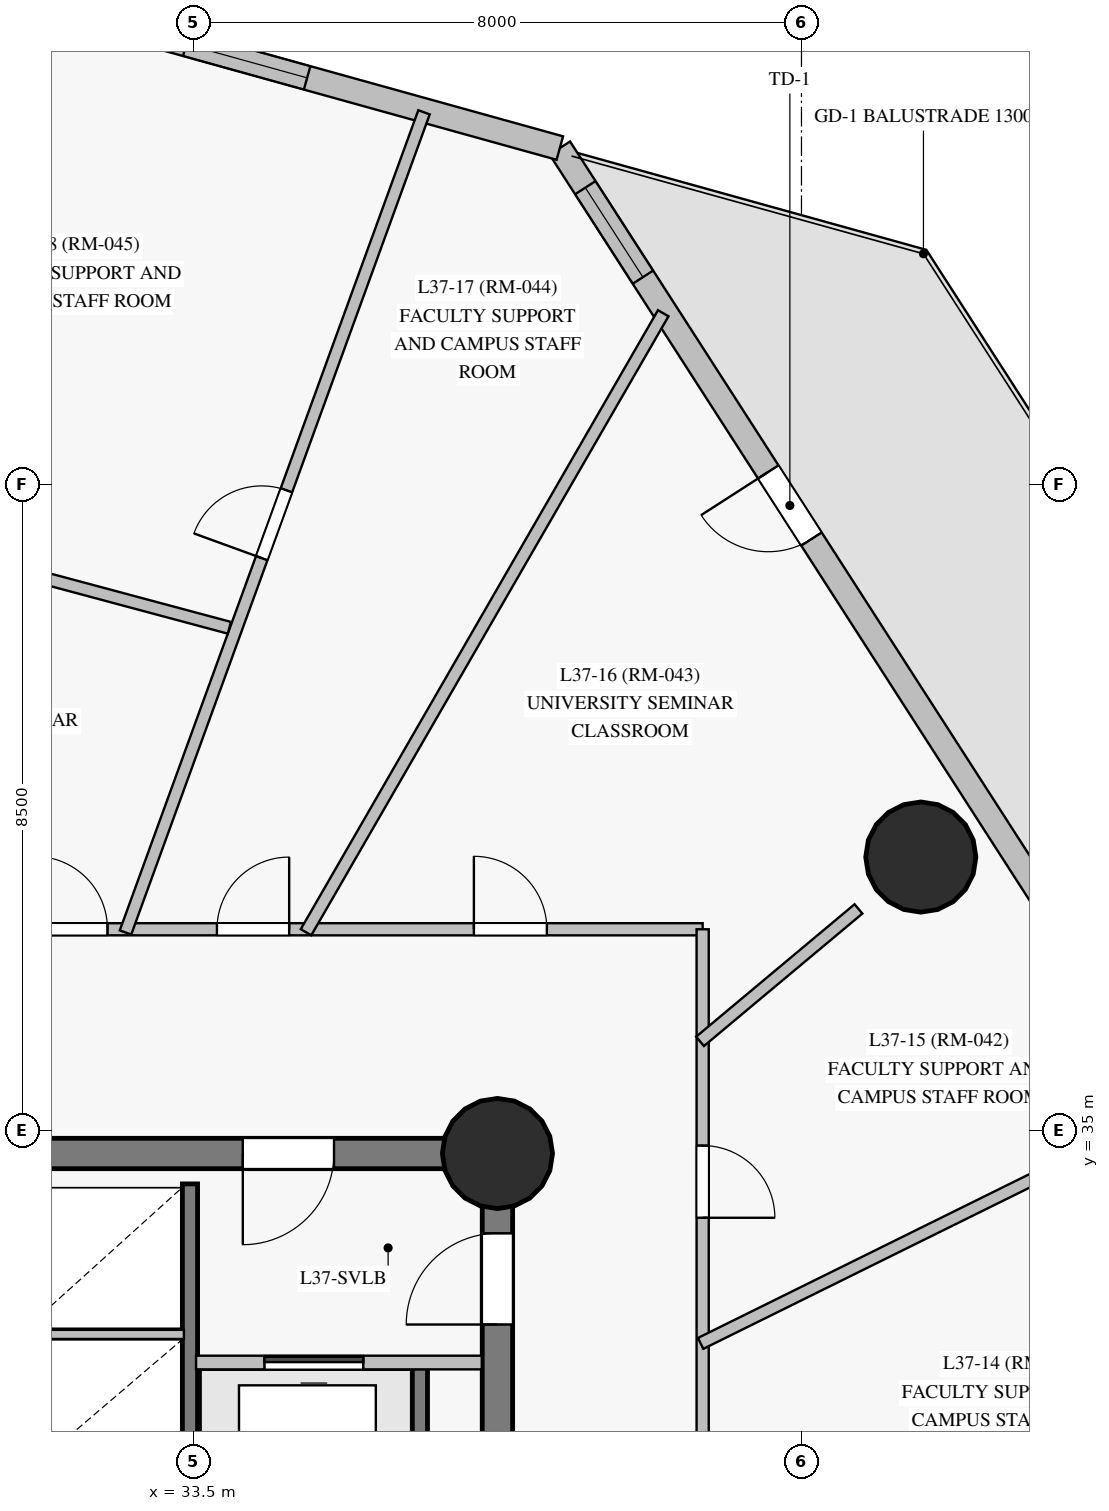
"""IFC4 building model, lengths in metres.
Left out: names, types, materials, properties, quantities, classifications, styles, units other than length and angle.
Written with IfcOpenShell. Run it as: python <this file> out.ifc"""

import sys

from ifc_helpers import new_model, si_unit, direction, frame, frame_2d, origin, origin_with_axes, origin_2d, place, context, subcontext, project, spatial, rectangle, circle, extrude, source, transform, mapped, element, fill, save


model = new_model("IFC4")
c1 = context("Model", 3, precision=1e-05, world=origin(), true_north=direction((0.0, 1.0)))
c2 = subcontext(c1, "Body", "Model", "MODEL_VIEW")
j1 = project(units=[si_unit("LENGTHUNIT", "METRE"), si_unit("PLANEANGLEUNIT", "RADIAN")], contexts=[c1])
p1 = place(None, origin())
s1 = spatial("IfcSite", under=j1, at=p1, CompositionType="ELEMENT")
p2 = place(p1, origin())
s2 = spatial("IfcBuilding", under=s1, at=p2, CompositionType="ELEMENT")
p3 = place(p2, frame((0.0, 0.0, 132.8)))
s3 = spatial("IfcBuildingStorey", under=s2, at=p3, CompositionType="ELEMENT", Elevation=132.8)
p4 = place(p3, frame((37.5, 18.3, 0.0), z_axis=(0.0, 0.0, 1.0), x_axis=(0.0, 1.0, 0.0)))
e1 = element("IfcWall", 1, at=p4, inside=s3, PredefinedType="SHEAR", context=c2, shape_type="SweptSolid", body=[
    extrude(rectangle(XDim=16.4, YDim=0.4, at=frame_2d((8.2, 0.0))), origin(), (0.0, 0.0, 1.0), 2.825),
])
p5 = place(p4, frame((14.15, 0.0, 0.0)))
e2 = element("IfcOpeningElement", 2, at=p5, cuts=e1, PredefinedType="OPENING", context=c2, shape_type="SweptSolid", body=[
    extrude(rectangle(XDim=1.2, YDim=2.15, at=frame_2d((0.6, 1.075))), frame((0.0, 0.21, 0.0), z_axis=(0.0, -1.0, 0.0), x_axis=(1.0, 0.0, 0.0)), (0.0, 0.0, 1.0), 0.42),
])
p6 = place(p3, frame((37.5, 34.7, 0.0), z_axis=(0.0, 0.0, 1.0), x_axis=(-1.0, 0.0, 0.0)))
e3 = element("IfcWall", 3, at=p6, inside=s3, PredefinedType="SHEAR", context=c2, shape_type="SweptSolid", body=[
    extrude(rectangle(XDim=10.95, YDim=0.4, at=frame_2d((5.475, 0.0))), origin(), (0.0, 0.0, 1.0), 2.825),
])
p7 = place(p6, frame((2.15, 0.0, 0.0)))
e4 = element("IfcOpeningElement", 4, at=p7, cuts=e3, PredefinedType="OPENING", context=c2, shape_type="SweptSolid", body=[
    extrude(rectangle(XDim=1.2, YDim=2.15, at=frame_2d((0.6, 1.075))), frame((0.0, 0.21, 0.0), z_axis=(0.0, -1.0, 0.0), x_axis=(1.0, 0.0, 0.0)), (0.0, 0.0, 1.0), 0.42),
])
p8 = place(p6, frame((6.35, 0.0, 0.0)))
e5 = element("IfcOpeningElement", 5, at=p8, cuts=e3, PredefinedType="OPENING", context=c2, shape_type="SweptSolid", body=[
    extrude(rectangle(XDim=1.1, YDim=2.15, at=frame_2d((0.55, 1.075))), frame((0.0, 0.21, 0.0), z_axis=(0.0, -1.0, 0.0), x_axis=(1.0, 0.0, 0.0)), (0.0, 0.0, 1.0), 0.42),
])
m1 = source(origin_with_axes(), c2, "Body", "SweptSolid", [
    extrude(circle(Radius=0.725, at=origin_2d()), origin(), (0.0, 0.0, 1.0), 3.05),
])
for number, where, z_axis, x_axis in (
    (6, (37.5, 34.7, 0.0), (0.0, 0.0, 1.0), (1.0, 0.0, 0.0)),
    (7, (43.07, 38.6, 0.0), (0.0, 0.0, 1.0), (1.0, 0.0, 0.0)),
):
    element("IfcColumn", number, at=place(p3, frame(where, z_axis=z_axis, x_axis=x_axis)), inside=s3, PredefinedType="COLUMN", context=c2, shape_type="MappedRepresentation", body=[
        mapped(m1, transform((0.0, 0.0, 0.0), scale=1.0)),
    ])
p9 = place(p3, frame((47.4, 33.821, 0.0), z_axis=(0.0, 0.0, 1.0), x_axis=(-0.541180462956, 0.840906479054, 0.0)))
e8 = element("IfcWall", 8, at=p9, inside=s3, PredefinedType="SOLIDWALL", context=c2, shape_type="SweptSolid", body=[
    extrude(rectangle(XDim=16.776, YDim=0.32, at=frame_2d((8.388, 0.0))), origin(), (0.0, 0.0, 1.0), 2.825),
])
p10 = place(p9, frame((2.885, 0.0, 0.85)))
e9 = element("IfcOpeningElement", 9, at=p10, cuts=e8, PredefinedType="OPENING", context=c2, shape_type="SweptSolid", body=[
    extrude(rectangle(XDim=1.65, YDim=1.65, at=frame_2d((0.825, 0.825))), frame((0.0, 0.17, 0.0), z_axis=(0.0, -1.0, 0.0), x_axis=(1.0, 0.0, 0.0)), (0.0, 0.0, 1.0), 0.34),
])
p11 = place(p9, frame((14.756, 0.0, 0.85)))
e10 = element("IfcOpeningElement", 10, at=p11, cuts=e8, PredefinedType="OPENING", context=c2, shape_type="SweptSolid", body=[
    extrude(rectangle(XDim=1.4, YDim=1.65, at=frame_2d((0.7, 0.825))), frame((0.0, 0.17, 0.0), z_axis=(0.0, -1.0, 0.0), x_axis=(1.0, 0.0, 0.0)), (0.0, 0.0, 1.0), 0.34),
])
p12 = place(p9, frame((10.659, 0.0, 0.0)))
e11 = element("IfcOpeningElement", 11, at=p12, cuts=e8, PredefinedType="OPENING", context=c2, shape_type="SweptSolid", body=[
    extrude(rectangle(XDim=1.05, YDim=2.12, at=frame_2d((0.525, 1.06))), frame((0.0, 0.17, 0.0), z_axis=(0.0, -1.0, 0.0), x_axis=(1.0, 0.0, 0.0)), (0.0, 0.0, 1.0), 0.34),
])
p13 = place(p3, frame((38.321, 47.927, 0.0), z_axis=(0.0, 0.0, 1.0), x_axis=(-0.963524117633, 0.267621513971, 0.0)))
e12 = element("IfcWall", 12, at=p13, inside=s3, PredefinedType="SOLIDWALL", context=c2, shape_type="SweptSolid", body=[
    extrude(rectangle(XDim=6.761, YDim=0.32, at=frame_2d((3.38, 0.0))), origin(), (0.0, 0.0, 1.0), 2.825),
])
p14 = place(p13, frame((3.451, 0.0, 0.85)))
e13 = element("IfcOpeningElement", 13, at=p14, cuts=e12, PredefinedType="OPENING", context=c2, shape_type="SweptSolid", body=[
    extrude(rectangle(XDim=1.65, YDim=1.65, at=frame_2d((0.825, 0.825))), frame((0.0, 0.17, 0.0), z_axis=(0.0, -1.0, 0.0), x_axis=(1.0, 0.0, 0.0)), (0.0, 0.0, 1.0), 0.34),
])
p15 = place(p3, frame((31.807, 49.737, 0.0), z_axis=(0.0, 0.0, 1.0), x_axis=(-0.971481548307, -0.237115164634, 0.0)))
e14 = element("IfcWall", 14, at=p15, inside=s3, PredefinedType="SOLIDWALL", context=c2, shape_type="SweptSolid", body=[
    extrude(rectangle(XDim=9.439, YDim=0.32, at=frame_2d((4.719, 0.0))), origin(), (0.0, 0.0, 1.0), 2.825),
])
p16 = place(p15, frame((0.752, 0.0, 0.85)))
e15 = element("IfcOpeningElement", 15, at=p16, cuts=e14, PredefinedType="OPENING", context=c2, shape_type="SweptSolid", body=[
    extrude(rectangle(XDim=1.65, YDim=1.65, at=frame_2d((0.825, 0.825))), frame((0.0, 0.17, 0.0), z_axis=(0.0, -1.0, 0.0), x_axis=(1.0, 0.0, 0.0)), (0.0, 0.0, 1.0), 0.34),
])
p17 = place(p15, frame((5.735, 0.0, 0.85)))
e16 = element("IfcOpeningElement", 16, at=p17, cuts=e14, PredefinedType="OPENING", context=c2, shape_type="SweptSolid", body=[
    extrude(rectangle(XDim=1.4, YDim=1.65, at=frame_2d((0.7, 0.825))), frame((0.0, 0.17, 0.0), z_axis=(0.0, -1.0, 0.0), x_axis=(1.0, 0.0, 0.0)), (0.0, 0.0, 1.0), 0.34),
])
p18 = place(p3, frame((33.455, 18.7, 0.0), z_axis=(0.0, 0.0, 1.0), x_axis=(0.0, 1.0, 0.0)))
e17 = element("IfcWall", 17, at=p18, inside=s3, PredefinedType="SHEAR", context=c2, shape_type="SweptSolid", body=[
    extrude(rectangle(XDim=15.6, YDim=0.2, at=frame_2d((7.8, 0.0))), origin(), (0.0, 0.0, 1.0), 2.825),
])
p19 = place(p18, frame((2.75, 0.0, 0.0)))
e18 = element("IfcOpeningElement", 18, at=p19, cuts=e17, PredefinedType="OPENING", context=c2, shape_type="SweptSolid", body=[
    extrude(rectangle(XDim=1.15, YDim=2.15, at=frame_2d((0.575, 1.075))), frame((0.0, 0.11, 0.0), z_axis=(0.0, -1.0, 0.0), x_axis=(1.0, 0.0, 0.0)), (0.0, 0.0, 1.0), 0.22),
])
p20 = place(p18, frame((0.55, 0.0, 0.0)))
e19 = element("IfcOpeningElement", 19, at=p20, cuts=e17, PredefinedType="OPENING", context=c2, shape_type="SweptSolid", body=[
    extrude(rectangle(XDim=0.94, YDim=2.1, at=frame_2d((0.47, 1.05))), frame((0.0, 0.11, 0.0), z_axis=(0.0, -1.0, 0.0), x_axis=(1.0, 0.0, 0.0)), (0.0, 0.0, 1.0), 0.22),
])
p21 = place(p3, frame((36.48, 29.02, 0.0), z_axis=(0.0, 0.0, 1.0), x_axis=(0.0, 1.0, 0.0)))
e20 = element("IfcWall", 20, at=p21, inside=s3, PredefinedType="SHEAR", context=c2, shape_type="SweptSolid", body=[
    extrude(rectangle(XDim=2.86, YDim=0.2, at=frame_2d((1.43, 0.0))), origin(), (0.0, 0.0, 1.0), 2.825),
])
p22 = place(p3, frame((16.7, 37.65, 0.0), z_axis=(0.0, 0.0, 1.0), x_axis=(1.0, 0.0, 0.0)))
e21 = element("IfcWall", 21, at=p22, inside=s3, PredefinedType="PARTITIONING", context=c2, shape_type="SweptSolid", body=[
    extrude(rectangle(XDim=23.5, YDim=0.16, at=frame_2d((11.75, 0.0))), origin(), (0.0, 0.0, 1.0), 2.325),
])
p23 = place(p22, frame((20.49, 0.0, 0.0)))
e22 = element("IfcOpeningElement", 22, at=p23, cuts=e21, PredefinedType="OPENING", context=c2, shape_type="SweptSolid", body=[
    extrude(rectangle(XDim=0.96, YDim=2.15, at=frame_2d((0.48, 1.075))), frame((0.0, 0.09, 0.0), z_axis=(0.0, -1.0, 0.0), x_axis=(1.0, 0.0, 0.0)), (0.0, 0.0, 1.0), 0.18),
])
p24 = place(p22, frame((17.11, 0.0, 0.0)))
e23 = element("IfcOpeningElement", 23, at=p24, cuts=e21, PredefinedType="OPENING", context=c2, shape_type="SweptSolid", body=[
    extrude(rectangle(XDim=0.95, YDim=2.15, at=frame_2d((0.475, 1.075))), frame((0.0, 0.09, 0.0), z_axis=(0.0, -1.0, 0.0), x_axis=(1.0, 0.0, 0.0)), (0.0, 0.0, 1.0), 0.18),
])
p25 = place(p22, frame((14.71, 0.0, 0.0)))
e24 = element("IfcOpeningElement", 24, at=p25, cuts=e21, PredefinedType="OPENING", context=c2, shape_type="SweptSolid", body=[
    extrude(rectangle(XDim=0.96, YDim=2.15, at=frame_2d((0.48, 1.075))), frame((0.0, 0.09, 0.0), z_axis=(0.0, -1.0, 0.0), x_axis=(1.0, 0.0, 0.0)), (0.0, 0.0, 1.0), 0.18),
])
p26 = place(p22, frame((10.785, 0.0, 0.0)))
e25 = element("IfcOpeningElement", 25, at=p26, cuts=e21, PredefinedType="OPENING", context=c2, shape_type="SweptSolid", body=[
    extrude(rectangle(XDim=0.95, YDim=2.15, at=frame_2d((0.475, 1.075))), frame((0.0, 0.09, 0.0), z_axis=(0.0, -1.0, 0.0), x_axis=(1.0, 0.0, 0.0)), (0.0, 0.0, 1.0), 0.18),
])
p27 = place(p22, frame((7.75, 0.0, 0.0)))
e26 = element("IfcOpeningElement", 26, at=p27, cuts=e21, PredefinedType="OPENING", context=c2, shape_type="SweptSolid", body=[
    extrude(rectangle(XDim=0.95, YDim=2.15, at=frame_2d((0.475, 1.075))), frame((0.0, 0.09, 0.0), z_axis=(0.0, -1.0, 0.0), x_axis=(1.0, 0.0, 0.0)), (0.0, 0.0, 1.0), 0.18),
])
p28 = place(p3, frame((40.2, 37.65, 0.0), z_axis=(0.0, 0.0, 1.0), x_axis=(0.0, -1.0, 0.0)))
e27 = element("IfcWall", 27, at=p28, inside=s3, PredefinedType="PARTITIONING", context=c2, shape_type="SweptSolid", body=[
    extrude(rectangle(XDim=22.3, YDim=0.16, at=frame_2d((11.15, 0.0))), origin(), (0.0, 0.0, 1.0), 2.325),
])
p29 = place(p28, frame((14.02, 0.0, 0.0)))
e28 = element("IfcOpeningElement", 28, at=p29, cuts=e27, PredefinedType="OPENING", context=c2, shape_type="SweptSolid", body=[
    extrude(rectangle(XDim=0.95, YDim=2.15, at=frame_2d((0.475, 1.075))), frame((0.0, 0.09, 0.0), z_axis=(0.0, -1.0, 0.0), x_axis=(1.0, 0.0, 0.0)), (0.0, 0.0, 1.0), 0.18),
])
p30 = place(p28, frame((10.185, 0.0, 0.0)))
e29 = element("IfcOpeningElement", 29, at=p30, cuts=e27, PredefinedType="OPENING", context=c2, shape_type="SweptSolid", body=[
    extrude(rectangle(XDim=0.96, YDim=2.15, at=frame_2d((0.48, 1.075))), frame((0.0, 0.09, 0.0), z_axis=(0.0, -1.0, 0.0), x_axis=(1.0, 0.0, 0.0)), (0.0, 0.0, 1.0), 0.18),
])
p31 = place(p28, frame((7.33, 0.0, 0.0)))
e30 = element("IfcOpeningElement", 30, at=p31, cuts=e27, PredefinedType="OPENING", context=c2, shape_type="SweptSolid", body=[
    extrude(rectangle(XDim=0.95, YDim=2.15, at=frame_2d((0.475, 1.075))), frame((0.0, 0.09, 0.0), z_axis=(0.0, -1.0, 0.0), x_axis=(1.0, 0.0, 0.0)), (0.0, 0.0, 1.0), 0.18),
])
p32 = place(p28, frame((2.846, 0.0, 0.0)))
e31 = element("IfcOpeningElement", 31, at=p32, cuts=e27, PredefinedType="OPENING", context=c2, shape_type="SweptSolid", body=[
    extrude(rectangle(XDim=0.95, YDim=2.15, at=frame_2d((0.475, 1.075))), frame((0.0, 0.09, 0.0), z_axis=(0.0, -1.0, 0.0), x_axis=(1.0, 0.0, 0.0)), (0.0, 0.0, 1.0), 0.18),
])
p33 = place(p3, frame((32.607, 37.608, 0.0), z_axis=(0.0, 0.0, 1.0), x_axis=(0.34201277542, 0.939695302452, 0.0)))
e32 = element("IfcWall", 32, at=p33, inside=s3, PredefinedType="PARTITIONING", context=c2, shape_type="SweptSolid", body=[
    extrude(rectangle(XDim=11.483, YDim=0.16, at=frame_2d((5.741, 0.0))), origin(), (0.0, 0.0, 1.0), 2.825),
])
p34 = place(p33, frame((5.241, 0.0, 0.0)))
e33 = element("IfcOpeningElement", 33, at=p34, cuts=e32, PredefinedType="OPENING", context=c2, shape_type="SweptSolid", body=[
    extrude(rectangle(XDim=0.95, YDim=2.15, at=frame_2d((0.475, 1.075))), frame((0.0, 0.09, 0.0), z_axis=(0.0, -1.0, 0.0), x_axis=(1.0, 0.0, 0.0)), (0.0, 0.0, 1.0), 0.18),
])
p35 = place(p3, frame((34.982, 37.611, 0.0), z_axis=(0.0, 0.0, 1.0), x_axis=(0.499853576741, 0.86610992479, 0.0)))
e34 = element("IfcWall", 34, at=p35, inside=s3, PredefinedType="PARTITIONING", context=c2, shape_type="SweptSolid", body=[
    extrude(rectangle(XDim=9.402, YDim=0.16, at=frame_2d((4.701, 0.0))), origin(), (0.0, 0.0, 1.0), 2.825),
])
p36 = place(p3, frame((40.173, 32.202, 0.0), z_axis=(0.0, 0.0, 1.0), x_axis=(0.896518370802, 0.443006558433, 0.0)))
e35 = element("IfcWall", 35, at=p36, inside=s3, PredefinedType="PARTITIONING", context=c2, shape_type="SweptSolid", body=[
    extrude(rectangle(XDim=6.972, YDim=0.16, at=frame_2d((3.486, 0.0))), origin(), (0.0, 0.0, 1.0), 2.825),
])
p37 = place(p3, frame((33.973, 41.616, 0.0), z_axis=(0.0, 0.0, 1.0), x_axis=(-0.965924884927, 0.258822558289, 0.0)))
e36 = element("IfcWall", 36, at=p37, inside=s3, PredefinedType="PARTITIONING", context=c2, shape_type="SweptSolid", body=[
    extrude(rectangle(XDim=5.41, YDim=0.16, at=frame_2d((2.705, 0.0))), origin(), (0.0, 0.0, 1.0), 2.325),
])
p38 = place(p3, frame((33.535, 31.95, 0.0), z_axis=(0.0, 0.0, 1.0), x_axis=(1.0, 0.0, 0.0)))
e37 = element("IfcWall", 37, at=p38, inside=s3, PredefinedType="PARTITIONING", context=c2, shape_type="SweptSolid", body=[
    extrude(rectangle(XDim=3.759, YDim=0.18, at=frame_2d((1.879, 0.0))), origin(), (0.0, 0.0, 1.0), 2.825),
])
p39 = place(p38, frame((0.9, 0.0, 0.0)))
e38 = element("IfcOpeningElement", 38, at=p39, cuts=e37, PredefinedType="OPENING", context=c2, shape_type="SweptSolid", body=[
    extrude(rectangle(XDim=1.3, YDim=2.2, at=frame_2d((0.65, 1.1))), frame((0.0, 0.1, 0.0), z_axis=(0.0, -1.0, 0.0), x_axis=(1.0, 0.0, 0.0)), (0.0, 0.0, 1.0), 0.2),
])
p40 = place(p3, frame((40.166, 36.175, 0.0), z_axis=(0.0, 0.0, 1.0), x_axis=(0.767203889696, 0.641403298741, 0.0)))
e39 = element("IfcWall", 39, at=p40, inside=s3, PredefinedType="PARTITIONING", context=c2, shape_type="SweptSolid", body=[
    extrude(rectangle(XDim=2.717, YDim=0.16, at=frame_2d((1.358, 0.0))), origin(), (0.0, 0.0, 1.0), 2.225),
])
p41 = place(p3, frame((31.3, 32.32, 0.0), z_axis=(0.0, 0.0, 1.0), x_axis=(1.0, 0.0, 0.0)))
e40 = element("IfcWall", 40, at=p41, inside=s3, PredefinedType="PARTITIONING", context=c2, shape_type="SweptSolid", body=[
    extrude(rectangle(XDim=2.075, YDim=0.12, at=frame_2d((1.038, 0.0))), origin(), (0.0, 0.0, 1.0), 2.825),
])
m2 = source(origin_with_axes(), c2, "Body", "SweptSolid", [
    extrude(rectangle(XDim=1.4, YDim=1.65, at=frame_2d((0.7, 0.825))), frame((0.0, 0.03, 0.0), z_axis=(0.0, -1.0, 0.0), x_axis=(1.0, 0.0, 0.0)), (0.0, 0.0, 1.0), 0.06),
])
p42 = place(p11, origin())
e41 = element("IfcWindow", 41, at=p42, inside=s3, PartitioningType="SINGLE_PANEL", PredefinedType="WINDOW", context=c2, shape_type="MappedRepresentation", body=[
    mapped(m2, transform((0.0, 0.0, 0.0), scale=1.0)),
])
fill(e10, e41)
m3 = source(origin_with_axes(), c2, "Body", "SweptSolid", [
    extrude(rectangle(XDim=1.65, YDim=1.65, at=frame_2d((0.825, 0.825))), frame((0.0, 0.03, 0.0), z_axis=(0.0, -1.0, 0.0), x_axis=(1.0, 0.0, 0.0)), (0.0, 0.0, 1.0), 0.06),
])
p43 = place(p14, origin())
e42 = element("IfcWindow", 42, at=p43, inside=s3, PartitioningType="SINGLE_PANEL", PredefinedType="WINDOW", context=c2, shape_type="MappedRepresentation", body=[
    mapped(m3, transform((0.0, 0.0, 0.0), scale=1.0)),
])
fill(e13, e42)
m4 = source(origin_with_axes(), c2, "Body", "SweptSolid", [
    extrude(rectangle(XDim=1.05, YDim=2.12, at=frame_2d((0.525, 1.06))), frame((0.0, 0.025, 0.0), z_axis=(0.0, -1.0, 0.0), x_axis=(1.0, 0.0, 0.0)), (0.0, 0.0, 1.0), 0.05),
])
p44 = place(p12, origin())
e43 = element("IfcDoor", 43, at=p44, inside=s3, OperationType="SINGLE_SWING_RIGHT", PredefinedType="DOOR", context=c2, shape_type="MappedRepresentation", body=[
    mapped(m4, transform((0.0, 0.0, 0.0), scale=1.0)),
])
fill(e11, e43)
m5 = source(origin_with_axes(), c2, "Body", "SweptSolid", [
    extrude(rectangle(XDim=1.2, YDim=2.15, at=frame_2d((0.6, 1.075))), frame((0.0, 0.025, 0.0), z_axis=(0.0, -1.0, 0.0), x_axis=(1.0, 0.0, 0.0)), (0.0, 0.0, 1.0), 0.05),
])
p45 = place(p5, origin())
e44 = element("IfcDoor", 44, at=p45, inside=s3, OperationType="SINGLE_SWING_LEFT", PredefinedType="DOOR", context=c2, shape_type="MappedRepresentation", body=[
    mapped(m5, transform((0.0, 0.0, 0.0), scale=1.0)),
])
fill(e2, e44)
p46 = place(p7, origin())
e45 = element("IfcDoor", 45, at=p46, inside=s3, OperationType="SINGLE_SWING_RIGHT", PredefinedType="DOOR", context=c2, shape_type="MappedRepresentation", body=[
    mapped(m5, transform((0.0, 0.0, 0.0), scale=1.0)),
])
fill(e4, e45)
m6 = source(origin_with_axes(), c2, "Body", "SweptSolid", [
    extrude(rectangle(XDim=1.3, YDim=2.2, at=frame_2d((0.65, 1.1))), frame((0.0, 0.025, 0.0), z_axis=(0.0, -1.0, 0.0), x_axis=(1.0, 0.0, 0.0)), (0.0, 0.0, 1.0), 0.05),
])
p47 = place(p39, origin())
e46 = element("IfcDoor", 46, at=p47, inside=s3, OperationType="SLIDING_TO_LEFT", PredefinedType="DOOR", context=c2, shape_type="MappedRepresentation", body=[
    mapped(m6, transform((0.0, 0.0, 0.0), scale=1.0)),
])
fill(e38, e46)
m7 = source(origin_with_axes(), c2, "Body", "SweptSolid", [
    extrude(rectangle(XDim=0.95, YDim=2.15, at=frame_2d((0.475, 1.075))), frame((0.0, 0.025, 0.0), z_axis=(0.0, -1.0, 0.0), x_axis=(1.0, 0.0, 0.0)), (0.0, 0.0, 1.0), 0.05),
])
p48 = place(p32, origin())
e47 = element("IfcDoor", 47, at=p48, inside=s3, OperationType="SINGLE_SWING_RIGHT", PredefinedType="DOOR", context=c2, shape_type="MappedRepresentation", body=[
    mapped(m7, transform((0.0, 0.0, 0.0), scale=1.0)),
])
fill(e31, e47)
m8 = source(origin_with_axes(), c2, "Body", "SweptSolid", [
    extrude(rectangle(XDim=0.96, YDim=2.15, at=frame_2d((0.48, 1.075))), frame((0.0, 0.025, 0.0), z_axis=(0.0, -1.0, 0.0), x_axis=(1.0, 0.0, 0.0)), (0.0, 0.0, 1.0), 0.05),
])
p49 = place(p23, origin())
e48 = element("IfcDoor", 48, at=p49, inside=s3, OperationType="SINGLE_SWING_LEFT", PredefinedType="DOOR", context=c2, shape_type="MappedRepresentation", body=[
    mapped(m8, transform((0.0, 0.0, 0.0), scale=1.0)),
])
fill(e22, e48)
p50 = place(p24, origin())
e49 = element("IfcDoor", 49, at=p50, inside=s3, OperationType="SINGLE_SWING_RIGHT", PredefinedType="DOOR", context=c2, shape_type="MappedRepresentation", body=[
    mapped(m7, transform((0.0, 0.0, 0.0), scale=1.0)),
])
fill(e23, e49)
p51 = place(p25, origin())
e50 = element("IfcDoor", 50, at=p51, inside=s3, OperationType="SINGLE_SWING_LEFT", PredefinedType="DOOR", context=c2, shape_type="MappedRepresentation", body=[
    mapped(m8, transform((0.0, 0.0, 0.0), scale=1.0)),
])
fill(e24, e50)
p52 = place(p34, origin())
e51 = element("IfcDoor", 51, at=p52, inside=s3, OperationType="SINGLE_SWING_LEFT", PredefinedType="DOOR", context=c2, shape_type="MappedRepresentation", body=[
    mapped(m7, transform((0.0, 0.0, 0.0), scale=1.0)),
])
fill(e33, e51)
save(model, sys.argv[1])
